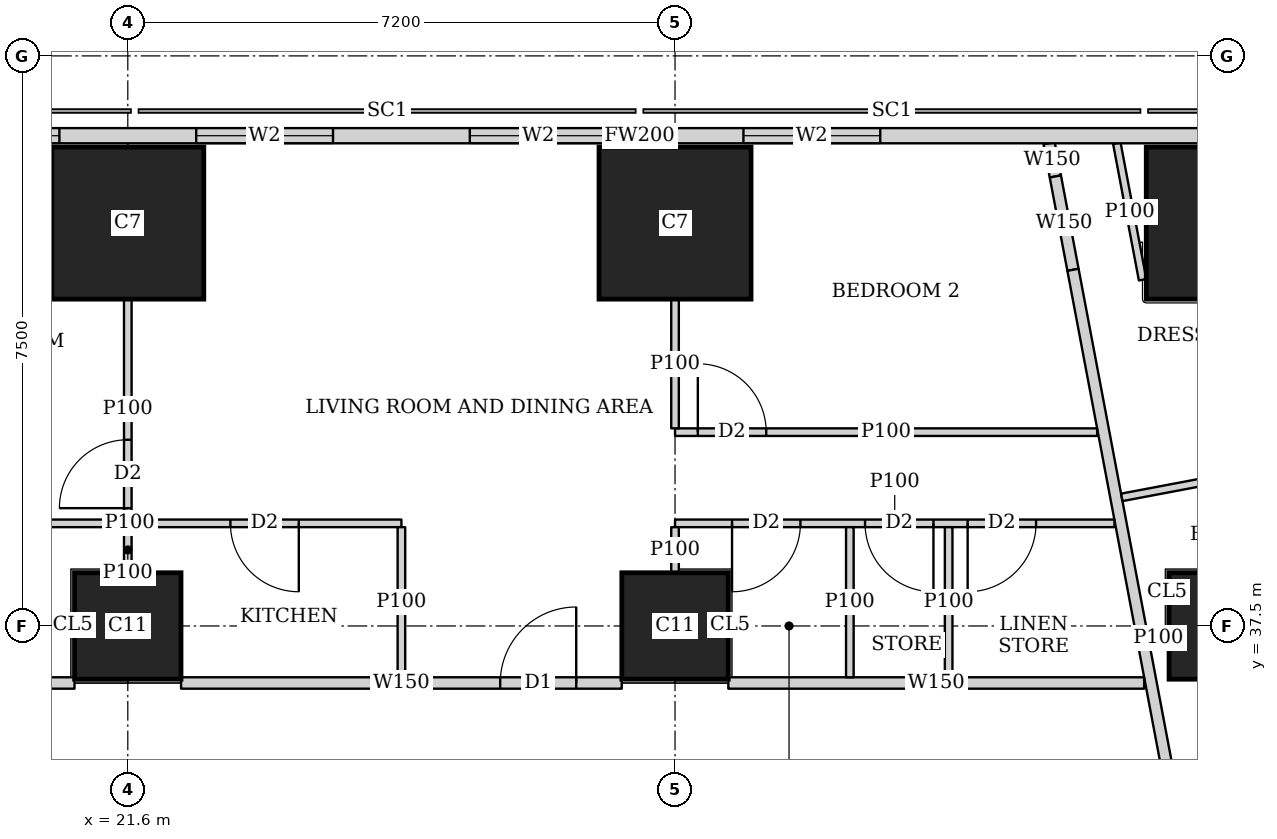
"""IFC4 building model, lengths in metres.
Left out: names, types, materials, properties, quantities, classifications, styles, units other than length and angle.
Written with IfcOpenShell. Run it as: python <this file> out.ifc"""

import sys

from ifc_helpers import new_model, si_unit, direction, frame, frame_2d, origin, origin_2d, place, context, subcontext, project, spatial, rectangle, extrude, element, fill, save


model = new_model("IFC4")
c1 = context("Model", 3, precision=1e-05, world=origin(), true_north=direction((0.0, 1.0)))
c2 = subcontext(c1, "Body", "Model", "MODEL_VIEW")
j1 = project(units=[si_unit("LENGTHUNIT", "METRE"), si_unit("PLANEANGLEUNIT", "RADIAN")], contexts=[c1])
p1 = place(None, origin())
s1 = spatial("IfcSite", under=j1, at=p1, CompositionType="ELEMENT")
p2 = place(p1, origin())
s2 = spatial("IfcBuilding", under=s1, at=p2, CompositionType="ELEMENT")
p3 = place(p2, frame((0.0, 0.0, 292.85)))
s3 = spatial("IfcBuildingStorey", under=s2, at=p3, CompositionType="ELEMENT", Elevation=292.85)
for number, where, z_axis, x_axis in (
    (1, (21.6, 37.5, 0.0), (0.0, 0.0, 1.0), (1.0, 0.0, 0.0)),
    (2, (28.8, 37.5, 0.0), (0.0, 0.0, 1.0), (1.0, 0.0, 0.0)),
    (3, (36.0, 37.5, 0.0), (0.0, 0.0, 1.0), (1.0, 0.0, 0.0)),
):
    element("IfcColumn", number, at=place(p3, frame(where, z_axis=z_axis, x_axis=x_axis)), inside=s3, PredefinedType="COLUMN", context=c2, shape_type="SweptSolid", body=[
        extrude(rectangle(XDim=1.4, YDim=1.4, at=origin_2d()), origin(), (0.0, 0.0, 1.0), 3.75),
    ])
for number, where, z_axis, x_axis in (
    (4, (21.6, 42.8, 0.0), (0.0, 0.0, 1.0), (1.0, 0.0, 0.0)),
    (5, (28.8, 42.8, 0.0), (0.0, 0.0, 1.0), (1.0, 0.0, 0.0)),
    (6, (36.0, 42.8, 0.0), (0.0, 0.0, 1.0), (1.0, 0.0, 0.0)),
):
    element("IfcColumn", number, at=place(p3, frame(where, z_axis=z_axis, x_axis=x_axis)), inside=s3, PredefinedType="COLUMN", context=c2, shape_type="SweptSolid", body=[
        extrude(rectangle(XDim=2.0, YDim=2.0, at=origin_2d()), origin(), (0.0, 0.0, 1.0), 3.75),
    ])
p4 = place(p3, frame((42.103, 43.95, 0.0), z_axis=(0.0, 0.0, 1.0), x_axis=(-1.0, 0.0, 0.0)))
e7 = element("IfcWall", 7, at=p4, inside=s3, PredefinedType="SOLIDWALL", context=c2, shape_type="SweptSolid", body=[
    extrude(rectangle(XDim=27.54, YDim=0.2, at=frame_2d((13.77, 0.0))), origin(), (0.0, 0.0, 1.0), 3.4),
])
p5 = place(p4, frame((10.603, 0.0, 0.9)))
e8 = element("IfcOpeningElement", 8, at=p5, cuts=e7, PredefinedType="OPENING", context=c2, shape_type="SweptSolid", body=[
    extrude(rectangle(XDim=1.8, YDim=1.5, at=frame_2d((0.9, 0.75))), frame((0.0, 0.11, 0.0), z_axis=(0.0, -1.0, 0.0), x_axis=(1.0, 0.0, 0.0)), (0.0, 0.0, 1.0), 0.22),
])
p6 = place(p4, frame((14.203, 0.0, 0.9)))
e9 = element("IfcOpeningElement", 9, at=p6, cuts=e7, PredefinedType="OPENING", context=c2, shape_type="SweptSolid", body=[
    extrude(rectangle(XDim=1.8, YDim=1.5, at=frame_2d((0.9, 0.75))), frame((0.0, 0.11, 0.0), z_axis=(0.0, -1.0, 0.0), x_axis=(1.0, 0.0, 0.0)), (0.0, 0.0, 1.0), 0.22),
])
p7 = place(p4, frame((17.803, 0.0, 0.9)))
e10 = element("IfcOpeningElement", 10, at=p7, cuts=e7, PredefinedType="OPENING", context=c2, shape_type="SweptSolid", body=[
    extrude(rectangle(XDim=1.8, YDim=1.5, at=frame_2d((0.9, 0.75))), frame((0.0, 0.11, 0.0), z_axis=(0.0, -1.0, 0.0), x_axis=(1.0, 0.0, 0.0)), (0.0, 0.0, 1.0), 0.22),
])
p8 = place(p4, frame((21.403, 0.0, 0.9)))
e11 = element("IfcOpeningElement", 11, at=p8, cuts=e7, PredefinedType="OPENING", context=c2, shape_type="SweptSolid", body=[
    extrude(rectangle(XDim=1.8, YDim=1.5, at=frame_2d((0.9, 0.75))), frame((0.0, 0.11, 0.0), z_axis=(0.0, -1.0, 0.0), x_axis=(1.0, 0.0, 0.0)), (0.0, 0.0, 1.0), 0.22),
])
p9 = place(p3, frame((16.001, 36.75, 0.0), z_axis=(0.0, 0.0, 1.0), x_axis=(1.0, 0.0, 0.0)))
e12 = element("IfcWall", 12, at=p9, inside=s3, PredefinedType="SOLIDWALL", context=c2, shape_type="SweptSolid", body=[
    extrude(rectangle(XDim=4.898, YDim=0.15, at=frame_2d((2.449, 0.0))), origin(), (0.0, 0.0, 1.0), 3.4),
])
p10 = place(p3, frame((22.301, 36.75, 0.0), z_axis=(0.0, 0.0, 1.0), x_axis=(1.0, 0.0, 0.0)))
e13 = element("IfcWall", 13, at=p10, inside=s3, PredefinedType="SOLIDWALL", context=c2, shape_type="SweptSolid", body=[
    extrude(rectangle(XDim=5.798, YDim=0.15, at=frame_2d((2.899, 0.0))), origin(), (0.0, 0.0, 1.0), 3.4),
])
p11 = place(p10, frame((4.199, 0.0, 0.0)))
e14 = element("IfcOpeningElement", 14, at=p11, cuts=e13, PredefinedType="OPENING", context=c2, shape_type="SweptSolid", body=[
    extrude(rectangle(XDim=1.0, YDim=2.1, at=frame_2d((0.5, 1.05))), frame((0.0, 0.085, 0.0), z_axis=(0.0, -1.0, 0.0), x_axis=(1.0, 0.0, 0.0)), (0.0, 0.0, 1.0), 0.17),
])
p12 = place(p3, frame((29.501, 36.75, 0.0), z_axis=(0.0, 0.0, 1.0), x_axis=(1.0, 0.0, 0.0)))
e15 = element("IfcWall", 15, at=p12, inside=s3, PredefinedType="SOLIDWALL", context=c2, shape_type="SweptSolid", body=[
    extrude(rectangle(XDim=5.471, YDim=0.15, at=frame_2d((2.735, 0.0))), origin(), (0.0, 0.0, 1.0), 3.4),
])
p13 = place(p3, frame((33.722, 43.85, 0.0), z_axis=(0.0, 0.0, 1.0), x_axis=(0.184886516626, -0.982759877066, 0.0)))
e16 = element("IfcWall", 16, at=p13, inside=s3, PredefinedType="SOLIDWALL", context=c2, shape_type="SweptSolid", body=[
    extrude(rectangle(XDim=0.444, YDim=0.15, at=frame_2d((0.222, 0.0))), origin(), (0.0, 0.0, 1.0), 3.4),
])
p14 = place(p3, frame((33.804, 43.414, 0.0), z_axis=(0.0, 0.0, 1.0), x_axis=(0.185585816539, -0.982628060204, 0.0)))
e17 = element("IfcWall", 17, at=p14, inside=s3, PredefinedType="SOLIDWALL", context=c2, shape_type="SweptSolid", body=[
    extrude(rectangle(XDim=1.25, YDim=0.15, at=frame_2d((0.625, 0.0))), origin(), (0.0, 0.0, 1.0), 1.95),
])
p15 = place(p3, frame((34.036, 42.186, 0.0), z_axis=(0.0, 0.0, 1.0), x_axis=(0.185593518645, -0.9826266055, 0.0)))
e18 = element("IfcWall", 18, at=p15, inside=s3, PredefinedType="SOLIDWALL", context=c2, shape_type="SweptSolid", body=[
    extrude(rectangle(XDim=35.961, YDim=0.15, at=frame_2d((17.98, 0.0))), origin(), (0.0, 0.0, 1.0), 2.4),
])
p16 = place(p15, frame((19.345, 0.0, 0.0)))
e19 = element("IfcOpeningElement", 19, at=p16, cuts=e18, PredefinedType="OPENING", context=c2, shape_type="SweptSolid", body=[
    extrude(rectangle(XDim=1.0, YDim=2.1, at=frame_2d((0.5, 1.05))), frame((0.0, 0.085, 0.0), z_axis=(0.0, -1.0, 0.0), x_axis=(1.0, 0.0, 0.0)), (0.0, 0.0, 1.0), 0.17),
])
p17 = place(p15, frame((33.774, 0.0, 0.0)))
e20 = element("IfcOpeningElement", 20, at=p17, cuts=e18, PredefinedType="OPENING", context=c2, shape_type="SweptSolid", body=[
    extrude(rectangle(XDim=1.0, YDim=2.1, at=frame_2d((0.5, 1.05))), frame((0.0, 0.085, 0.0), z_axis=(0.0, -1.0, 0.0), x_axis=(1.0, 0.0, 0.0)), (0.0, 0.0, 1.0), 0.17),
])
p18 = place(p3, frame((34.952, 42.055, 0.0), z_axis=(0.0, 0.0, 1.0), x_axis=(-0.185490642006, 0.98264603074, 0.0)))
e21 = element("IfcWall", 21, at=p18, inside=s3, PredefinedType="PARTITIONING", context=c2, shape_type="SweptSolid", body=[
    extrude(rectangle(XDim=1.827, YDim=0.1, at=frame_2d((0.914, 0.0))), origin(), (0.0, 0.0, 1.0), 1.95),
])
p19 = place(p3, frame((37.896, 39.8, 0.0), z_axis=(0.0, 0.0, 1.0), x_axis=(-0.982607026909, -0.185697147715, 0.0)))
e22 = element("IfcWall", 22, at=p19, inside=s3, PredefinedType="PARTITIONING", context=c2, shape_type="SweptSolid", body=[
    extrude(rectangle(XDim=3.275, YDim=0.1, at=frame_2d((1.637, 0.0))), origin(), (0.0, 0.0, 1.0), 3.4),
])
p20 = place(p3, frame((35.29, 37.366, 0.0), z_axis=(0.0, 0.0, 1.0), x_axis=(-0.982395465615, -0.18681313963, 0.0)))
e23 = element("IfcWall", 23, at=p20, inside=s3, PredefinedType="PARTITIONING", context=c2, shape_type="SweptSolid", body=[
    extrude(rectangle(XDim=0.263, YDim=0.1, at=frame_2d((0.131, 0.0))), origin(), (0.0, 0.0, 1.0), 3.4),
])
p21 = place(p3, frame((21.6, 38.9, 0.0), z_axis=(0.0, 0.0, 1.0), x_axis=(0.0, 1.0, 0.0)))
e24 = element("IfcWall", 24, at=p21, inside=s3, PredefinedType="PARTITIONING", context=c2, shape_type="SweptSolid", body=[
    extrude(rectangle(XDim=2.899, YDim=0.1, at=frame_2d((1.45, 0.0))), origin(), (0.0, 0.0, 1.0), 3.4),
])
p22 = place(p21, frame((0.15, 0.0, 0.0)))
e25 = element("IfcOpeningElement", 25, at=p22, cuts=e24, PredefinedType="OPENING", context=c2, shape_type="SweptSolid", body=[
    extrude(rectangle(XDim=0.9, YDim=2.1, at=frame_2d((0.45, 1.05))), frame((0.0, 0.06, 0.0), z_axis=(0.0, -1.0, 0.0), x_axis=(1.0, 0.0, 0.0)), (0.0, 0.0, 1.0), 0.12),
])
p23 = place(p3, frame((28.8, 40.1, 0.0), z_axis=(0.0, 0.0, 1.0), x_axis=(0.0, 1.0, 0.0)))
e26 = element("IfcWall", 26, at=p23, inside=s3, PredefinedType="PARTITIONING", context=c2, shape_type="SweptSolid", body=[
    extrude(rectangle(XDim=1.699, YDim=0.1, at=frame_2d((0.85, 0.0))), origin(), (0.0, 0.0, 1.0), 3.4),
])
p24 = place(p3, frame((21.6, 38.201, 0.0), z_axis=(0.0, 0.0, 1.0), x_axis=(0.0, 1.0, 0.0)))
e27 = element("IfcWall", 27, at=p24, inside=s3, PredefinedType="PARTITIONING", context=c2, shape_type="SweptSolid", body=[
    extrude(rectangle(XDim=0.599, YDim=0.1, at=frame_2d((0.3, 0.0))), origin(), (0.0, 0.0, 1.0), 3.4),
])
p25 = place(p3, frame((25.2, 36.825, 0.0), z_axis=(0.0, 0.0, 1.0), x_axis=(0.0, 1.0, 0.0)))
e28 = element("IfcWall", 28, at=p25, inside=s3, PredefinedType="PARTITIONING", context=c2, shape_type="SweptSolid", body=[
    extrude(rectangle(XDim=1.975, YDim=0.1, at=frame_2d((0.988, 0.0))), origin(), (0.0, 0.0, 1.0), 3.4),
])
p26 = place(p3, frame((28.8, 38.201, 0.0), z_axis=(0.0, 0.0, 1.0), x_axis=(0.0, 1.0, 0.0)))
e29 = element("IfcWall", 29, at=p26, inside=s3, PredefinedType="PARTITIONING", context=c2, shape_type="SweptSolid", body=[
    extrude(rectangle(XDim=0.599, YDim=0.1, at=frame_2d((0.3, 0.0))), origin(), (0.0, 0.0, 1.0), 3.4),
])
for number, where, z_axis, x_axis in (
    (30, (32.4, 36.825, 0.0), (0.0, 0.0, 1.0), (0.0, 1.0, 0.0)),
    (31, (31.1, 36.825, 0.0), (0.0, 0.0, 1.0), (0.0, 1.0, 0.0)),
):
    element("IfcWall", number, at=place(p3, frame(where, z_axis=z_axis, x_axis=x_axis)), inside=s3, PredefinedType="PARTITIONING", context=c2, shape_type="SweptSolid", body=[
        extrude(rectangle(XDim=1.975, YDim=0.1, at=frame_2d((0.988, 0.0))), origin(), (0.0, 0.0, 1.0), 3.4),
    ])
p27 = place(p3, frame((18.05, 38.85, 0.0), z_axis=(0.0, 0.0, 1.0), x_axis=(1.0, 0.0, 0.0)))
e32 = element("IfcWall", 32, at=p27, inside=s3, PredefinedType="PARTITIONING", context=c2, shape_type="SweptSolid", body=[
    extrude(rectangle(XDim=7.15, YDim=0.1, at=frame_2d((3.575, 0.0))), origin(), (0.0, 0.0, 1.0), 3.4),
])
p28 = place(p27, frame((1.3, 0.0, 0.0)))
e33 = element("IfcOpeningElement", 33, at=p28, cuts=e32, PredefinedType="OPENING", context=c2, shape_type="SweptSolid", body=[
    extrude(rectangle(XDim=0.9, YDim=2.1, at=frame_2d((0.45, 1.05))), frame((0.0, 0.06, 0.0), z_axis=(0.0, -1.0, 0.0), x_axis=(1.0, 0.0, 0.0)), (0.0, 0.0, 1.0), 0.12),
])
p29 = place(p27, frame((4.9, 0.0, 0.0)))
e34 = element("IfcOpeningElement", 34, at=p29, cuts=e32, PredefinedType="OPENING", context=c2, shape_type="SweptSolid", body=[
    extrude(rectangle(XDim=0.9, YDim=2.1, at=frame_2d((0.45, 1.05))), frame((0.0, 0.06, 0.0), z_axis=(0.0, -1.0, 0.0), x_axis=(1.0, 0.0, 0.0)), (0.0, 0.0, 1.0), 0.12),
])
p30 = place(p3, frame((28.8, 38.85, 0.0), z_axis=(0.0, 0.0, 1.0), x_axis=(1.0, 0.0, 0.0)))
e35 = element("IfcWall", 35, at=p30, inside=s3, PredefinedType="PARTITIONING", context=c2, shape_type="SweptSolid", body=[
    extrude(rectangle(XDim=5.781, YDim=0.1, at=frame_2d((2.891, 0.0))), origin(), (0.0, 0.0, 1.0), 3.4),
])
p31 = place(p30, frame((0.75, 0.0, 0.0)))
e36 = element("IfcOpeningElement", 36, at=p31, cuts=e35, PredefinedType="OPENING", context=c2, shape_type="SweptSolid", body=[
    extrude(rectangle(XDim=0.9, YDim=2.1, at=frame_2d((0.45, 1.05))), frame((0.0, 0.06, 0.0), z_axis=(0.0, -1.0, 0.0), x_axis=(1.0, 0.0, 0.0)), (0.0, 0.0, 1.0), 0.12),
])
p32 = place(p30, frame((2.5, 0.0, 0.0)))
e37 = element("IfcOpeningElement", 37, at=p32, cuts=e35, PredefinedType="OPENING", context=c2, shape_type="SweptSolid", body=[
    extrude(rectangle(XDim=0.9, YDim=2.1, at=frame_2d((0.45, 1.05))), frame((0.0, 0.06, 0.0), z_axis=(0.0, -1.0, 0.0), x_axis=(1.0, 0.0, 0.0)), (0.0, 0.0, 1.0), 0.12),
])
p33 = place(p30, frame((3.85, 0.0, 0.0)))
e38 = element("IfcOpeningElement", 38, at=p33, cuts=e35, PredefinedType="OPENING", context=c2, shape_type="SweptSolid", body=[
    extrude(rectangle(XDim=0.9, YDim=2.1, at=frame_2d((0.45, 1.05))), frame((0.0, 0.06, 0.0), z_axis=(0.0, -1.0, 0.0), x_axis=(1.0, 0.0, 0.0)), (0.0, 0.0, 1.0), 0.12),
])
p34 = place(p3, frame((28.8, 40.05, 0.0), z_axis=(0.0, 0.0, 1.0), x_axis=(1.0, 0.0, 0.0)))
e39 = element("IfcWall", 39, at=p34, inside=s3, PredefinedType="PARTITIONING", context=c2, shape_type="SweptSolid", body=[
    extrude(rectangle(XDim=5.554, YDim=0.1, at=frame_2d((2.777, 0.0))), origin(), (0.0, 0.0, 1.0), 3.4),
])
p35 = place(p34, frame((0.3, 0.0, 0.0)))
e40 = element("IfcOpeningElement", 40, at=p35, cuts=e39, PredefinedType="OPENING", context=c2, shape_type="SweptSolid", body=[
    extrude(rectangle(XDim=0.9, YDim=2.1, at=frame_2d((0.45, 1.05))), frame((0.0, 0.06, 0.0), z_axis=(0.0, -1.0, 0.0), x_axis=(1.0, 0.0, 0.0)), (0.0, 0.0, 1.0), 0.12),
])
p36 = place(p5, origin())
e41 = element("IfcWindow", 41, at=p36, inside=s3, PartitioningType="SINGLE_PANEL", PredefinedType="WINDOW", context=c2, shape_type="SweptSolid", body=[
    extrude(rectangle(XDim=1.8, YDim=1.5, at=frame_2d((0.9, 0.75))), frame((0.0, 0.03, 0.0), z_axis=(0.0, -1.0, 0.0), x_axis=(1.0, 0.0, 0.0)), (0.0, 0.0, 1.0), 0.06),
])
fill(e8, e41)
p37 = place(p6, origin())
e42 = element("IfcWindow", 42, at=p37, inside=s3, PartitioningType="SINGLE_PANEL", PredefinedType="WINDOW", context=c2, shape_type="SweptSolid", body=[
    extrude(rectangle(XDim=1.8, YDim=1.5, at=frame_2d((0.9, 0.75))), frame((0.0, 0.03, 0.0), z_axis=(0.0, -1.0, 0.0), x_axis=(1.0, 0.0, 0.0)), (0.0, 0.0, 1.0), 0.06),
])
fill(e9, e42)
p38 = place(p7, origin())
e43 = element("IfcWindow", 43, at=p38, inside=s3, PartitioningType="SINGLE_PANEL", PredefinedType="WINDOW", context=c2, shape_type="SweptSolid", body=[
    extrude(rectangle(XDim=1.8, YDim=1.5, at=frame_2d((0.9, 0.75))), frame((0.0, 0.03, 0.0), z_axis=(0.0, -1.0, 0.0), x_axis=(1.0, 0.0, 0.0)), (0.0, 0.0, 1.0), 0.06),
])
fill(e10, e43)
p39 = place(p8, origin())
e44 = element("IfcWindow", 44, at=p39, inside=s3, PartitioningType="SINGLE_PANEL", PredefinedType="WINDOW", context=c2, shape_type="SweptSolid", body=[
    extrude(rectangle(XDim=1.8, YDim=1.5, at=frame_2d((0.9, 0.75))), frame((0.0, 0.03, 0.0), z_axis=(0.0, -1.0, 0.0), x_axis=(1.0, 0.0, 0.0)), (0.0, 0.0, 1.0), 0.06),
])
fill(e11, e44)
p40 = place(p22, origin())
e45 = element("IfcDoor", 45, at=p40, inside=s3, OperationType="SINGLE_SWING_LEFT", PredefinedType="DOOR", context=c2, shape_type="SweptSolid", body=[
    extrude(rectangle(XDim=0.9, YDim=2.1, at=frame_2d((0.45, 1.05))), frame((0.0, 0.025, 0.0), z_axis=(0.0, -1.0, 0.0), x_axis=(1.0, 0.0, 0.0)), (0.0, 0.0, 1.0), 0.05),
])
fill(e25, e45)
p41 = place(p29, origin())
e46 = element("IfcDoor", 46, at=p41, inside=s3, OperationType="SINGLE_SWING_LEFT", PredefinedType="DOOR", context=c2, shape_type="SweptSolid", body=[
    extrude(rectangle(XDim=0.9, YDim=2.1, at=frame_2d((0.45, 1.05))), frame((0.0, 0.025, 0.0), z_axis=(0.0, -1.0, 0.0), x_axis=(1.0, 0.0, 0.0)), (0.0, 0.0, 1.0), 0.05),
])
fill(e34, e46)
p42 = place(p35, origin())
e47 = element("IfcDoor", 47, at=p42, inside=s3, OperationType="SINGLE_SWING_LEFT", PredefinedType="DOOR", context=c2, shape_type="SweptSolid", body=[
    extrude(rectangle(XDim=0.9, YDim=2.1, at=frame_2d((0.45, 1.05))), frame((0.0, 0.025, 0.0), z_axis=(0.0, -1.0, 0.0), x_axis=(1.0, 0.0, 0.0)), (0.0, 0.0, 1.0), 0.05),
])
fill(e40, e47)
p43 = place(p31, origin())
e48 = element("IfcDoor", 48, at=p43, inside=s3, OperationType="SINGLE_SWING_RIGHT", PredefinedType="DOOR", context=c2, shape_type="SweptSolid", body=[
    extrude(rectangle(XDim=0.9, YDim=2.1, at=frame_2d((0.45, 1.05))), frame((0.0, 0.025, 0.0), z_axis=(0.0, -1.0, 0.0), x_axis=(1.0, 0.0, 0.0)), (0.0, 0.0, 1.0), 0.05),
])
fill(e36, e48)
p44 = place(p32, origin())
e49 = element("IfcDoor", 49, at=p44, inside=s3, OperationType="SINGLE_SWING_LEFT", PredefinedType="DOOR", context=c2, shape_type="SweptSolid", body=[
    extrude(rectangle(XDim=0.9, YDim=2.1, at=frame_2d((0.45, 1.05))), frame((0.0, 0.025, 0.0), z_axis=(0.0, -1.0, 0.0), x_axis=(1.0, 0.0, 0.0)), (0.0, 0.0, 1.0), 0.05),
])
fill(e37, e49)
p45 = place(p33, origin())
e50 = element("IfcDoor", 50, at=p45, inside=s3, OperationType="SINGLE_SWING_RIGHT", PredefinedType="DOOR", context=c2, shape_type="SweptSolid", body=[
    extrude(rectangle(XDim=0.9, YDim=2.1, at=frame_2d((0.45, 1.05))), frame((0.0, 0.025, 0.0), z_axis=(0.0, -1.0, 0.0), x_axis=(1.0, 0.0, 0.0)), (0.0, 0.0, 1.0), 0.05),
])
fill(e38, e50)
p46 = place(p11, origin())
e51 = element("IfcDoor", 51, at=p46, inside=s3, OperationType="SINGLE_SWING_RIGHT", PredefinedType="DOOR", context=c2, shape_type="SweptSolid", body=[
    extrude(rectangle(XDim=1.0, YDim=2.1, at=frame_2d((0.5, 1.05))), frame((0.0, 0.025, 0.0), z_axis=(0.0, -1.0, 0.0), x_axis=(1.0, 0.0, 0.0)), (0.0, 0.0, 1.0), 0.05),
])
fill(e14, e51)
save(model, sys.argv[1])
